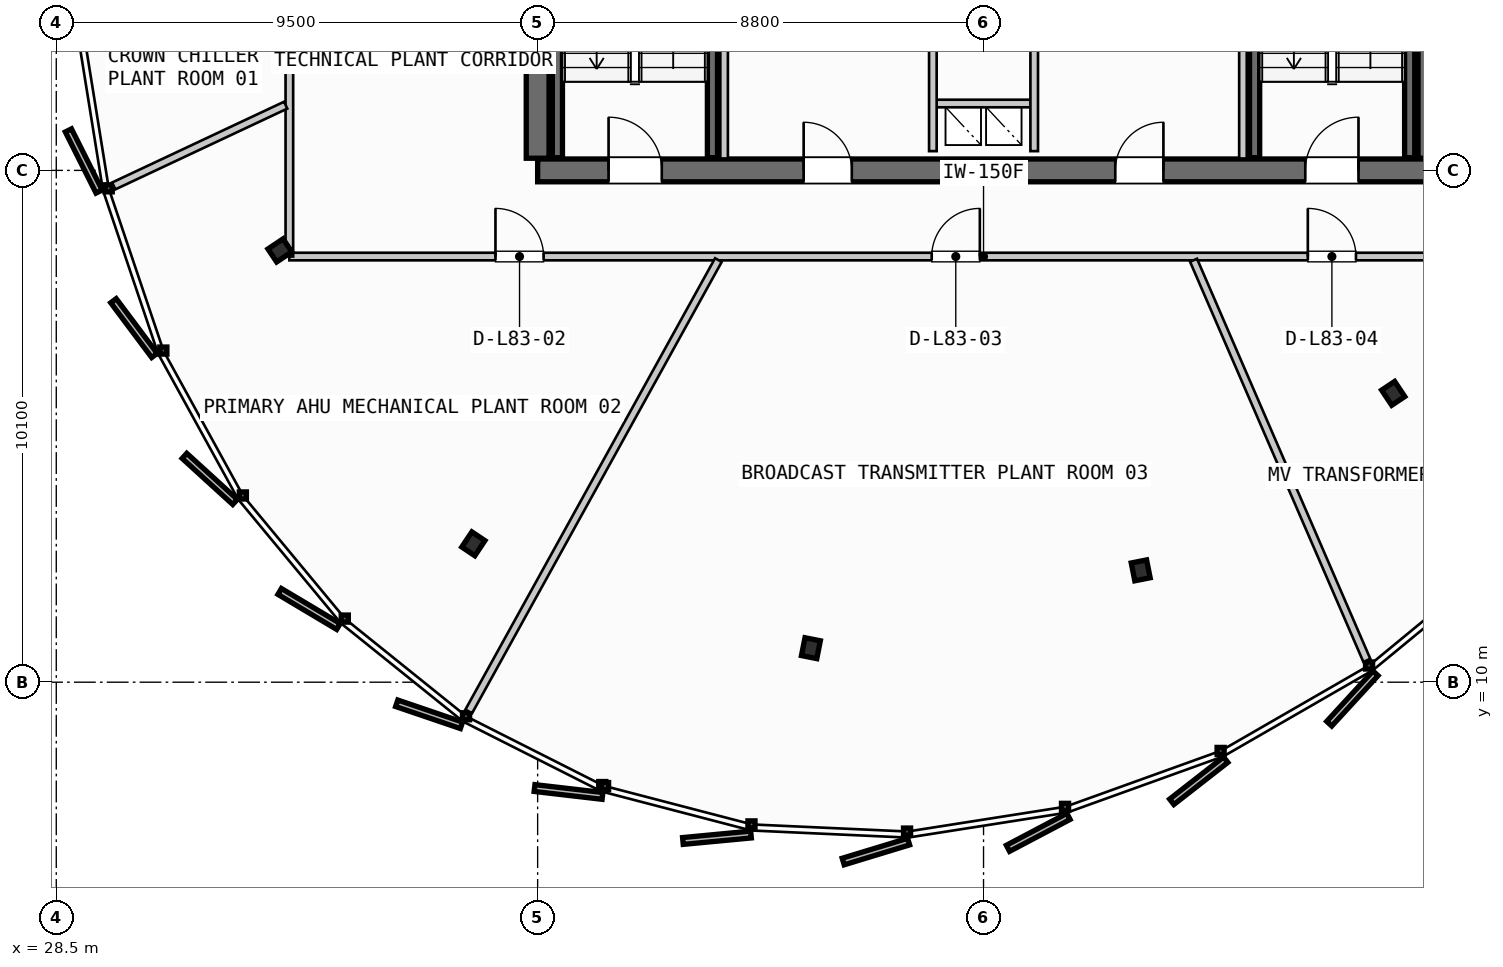
"""IFC4 building model, lengths in metres.
Left out: names, types, materials, properties, quantities, classifications, styles, units other than length and angle.
Written with IfcOpenShell. Run it as: python <this file> out.ifc"""

import sys

from ifc_helpers import new_model, si_unit, direction, frame, frame_2d, origin, origin_2d, place, context, subcontext, project, spatial, rectangle, i_section, extrude, source, transform, mapped, element, fill, save


model = new_model("IFC4")
c1 = context("Model", 3, precision=1e-05, world=origin(), true_north=direction((0.0, 1.0)))
c2 = subcontext(c1, "Body", "Model", "MODEL_VIEW")
j1 = project(units=[si_unit("LENGTHUNIT", "METRE"), si_unit("PLANEANGLEUNIT", "RADIAN")], contexts=[c1])
p1 = place(None, origin())
s1 = spatial("IfcSite", under=j1, at=p1, CompositionType="ELEMENT")
p2 = place(p1, origin())
s2 = spatial("IfcBuilding", under=s1, at=p2, CompositionType="ELEMENT")
p3 = place(p2, frame((0.0, 0.0, 312.3)))
s3 = spatial("IfcBuildingStorey", under=s2, at=p3, CompositionType="ELEMENT", Elevation=312.3)
p4 = place(p3, frame((38.0, 20.1, 0.0), z_axis=(0.0, 0.0, 1.0), x_axis=(1.0, 0.0, 0.0)))
e1 = element("IfcWall", 1, at=p4, inside=s3, PredefinedType="SHEAR", context=c2, shape_type="SweptSolid", body=[
    extrude(rectangle(XDim=17.6, YDim=0.45, at=frame_2d((8.8, 0.0))), origin(), (0.0, 0.0, 1.0), 3.735),
])
p5 = place(p4, frame((1.4, 0.0, 0.0)))
e2 = element("IfcOpeningElement", 2, at=p5, cuts=e1, PredefinedType="OPENING", context=c2, shape_type="SweptSolid", body=[
    extrude(rectangle(XDim=1.05, YDim=2.15, at=frame_2d((0.525, 1.075))), frame((0.0, 0.235, 0.0), z_axis=(0.0, -1.0, 0.0), x_axis=(1.0, 0.0, 0.0)), (0.0, 0.0, 1.0), 0.47),
])
p6 = place(p4, frame((15.15, 0.0, 0.0)))
e3 = element("IfcOpeningElement", 3, at=p6, cuts=e1, PredefinedType="OPENING", context=c2, shape_type="SweptSolid", body=[
    extrude(rectangle(XDim=1.05, YDim=2.15, at=frame_2d((0.525, 1.075))), frame((0.0, 0.235, 0.0), z_axis=(0.0, -1.0, 0.0), x_axis=(1.0, 0.0, 0.0)), (0.0, 0.0, 1.0), 0.47),
])
p7 = place(p4, frame((5.25, 0.0, 0.0)))
e4 = element("IfcOpeningElement", 4, at=p7, cuts=e1, PredefinedType="OPENING", context=c2, shape_type="SweptSolid", body=[
    extrude(rectangle(XDim=0.95, YDim=2.15, at=frame_2d((0.475, 1.075))), frame((0.0, 0.235, 0.0), z_axis=(0.0, -1.0, 0.0), x_axis=(1.0, 0.0, 0.0)), (0.0, 0.0, 1.0), 0.47),
])
p8 = place(p4, frame((11.4, 0.0, 0.0)))
e5 = element("IfcOpeningElement", 5, at=p8, cuts=e1, PredefinedType="OPENING", context=c2, shape_type="SweptSolid", body=[
    extrude(rectangle(XDim=0.95, YDim=2.15, at=frame_2d((0.475, 1.075))), frame((0.0, 0.235, 0.0), z_axis=(0.0, -1.0, 0.0), x_axis=(1.0, 0.0, 0.0)), (0.0, 0.0, 1.0), 0.47),
])
p9 = place(p3, frame((38.0, 35.26, 0.0), z_axis=(0.0, 0.0, 1.0), x_axis=(0.0, -1.0, 0.0)))
e6 = element("IfcWall", 6, at=p9, inside=s3, PredefinedType="SHEAR", context=c2, shape_type="SweptSolid", body=[
    extrude(rectangle(XDim=14.92, YDim=0.45, at=frame_2d((7.46, 0.0))), origin(), (0.0, 0.0, 1.0), 3.735),
])
p10 = place(p9, frame((5.21, 0.0, 0.0)))
e7 = element("IfcOpeningElement", 7, at=p10, cuts=e6, PredefinedType="OPENING", context=c2, shape_type="SweptSolid", body=[
    extrude(rectangle(XDim=1.1, YDim=2.2, at=frame_2d((0.55, 1.1))), frame((0.0, 0.235, 0.0), z_axis=(0.0, -1.0, 0.0), x_axis=(1.0, 0.0, 0.0)), (0.0, 0.0, 1.0), 0.47),
])
p11 = place(p3, frame((55.6, 20.34, 0.0), z_axis=(0.0, 0.0, 1.0), x_axis=(0.0, 1.0, 0.0)))
e8 = element("IfcWall", 8, at=p11, inside=s3, PredefinedType="SHEAR", context=c2, shape_type="SweptSolid", body=[
    extrude(rectangle(XDim=14.92, YDim=0.45, at=frame_2d((7.46, 0.0))), origin(), (0.0, 0.0, 1.0), 3.735),
])
p12 = place(p11, frame((12.71, 0.0, 0.0)))
e9 = element("IfcOpeningElement", 9, at=p12, cuts=e8, PredefinedType="OPENING", context=c2, shape_type="SweptSolid", body=[
    extrude(rectangle(XDim=1.05, YDim=2.15, at=frame_2d((0.525, 1.075))), frame((0.0, 0.235, 0.0), z_axis=(0.0, -1.0, 0.0), x_axis=(1.0, 0.0, 0.0)), (0.0, 0.0, 1.0), 0.47),
])
p13 = place(p11, frame((8.61, 0.0, 0.0)))
e10 = element("IfcOpeningElement", 10, at=p13, cuts=e8, PredefinedType="OPENING", context=c2, shape_type="SweptSolid", body=[
    extrude(rectangle(XDim=1.1, YDim=2.2, at=frame_2d((0.55, 1.1))), frame((0.0, 0.235, 0.0), z_axis=(0.0, -1.0, 0.0), x_axis=(1.0, 0.0, 0.0)), (0.0, 0.0, 1.0), 0.47),
])
m1 = source(origin(), c2, "Body", "SweptSolid", [
    extrude(i_section(OverallWidth=0.309, OverallDepth=0.359, WebThickness=0.016, FlangeThickness=0.026, FilletRadius=0.027, at=origin_2d()), origin(), (0.0, 0.0, 1.0), 3.735),
])
for number, where, z_axis, x_axis in (
    (11, (32.913, 18.521, 0.0), (0.0, 0.0, 1.0), (-0.831, -0.556, 0.0)),
    (12, (36.731, 12.731, 0.0), (0.0, 0.0, 1.0), (-0.556, -0.831, 0.0)),
    (13, (43.393, 10.671, 0.0), (0.0, 0.0, 1.0), (-0.195, -0.981, 0.0)),
    (14, (49.902, 12.207, 0.0), (0.0, 0.0, 1.0), (0.195, -0.981, 0.0)),
    (15, (54.885, 15.7, 0.0), (0.0, 0.0, 1.0), (0.556, -0.831, 0.0)),
):
    element("IfcColumn", number, at=place(p3, frame(where, z_axis=z_axis, x_axis=x_axis)), inside=s3, PredefinedType="COLUMN", context=c2, shape_type="MappedRepresentation", body=[
        mapped(m1, transform((0.0, 0.0, 0.0), scale=1.0)),
    ])
for number, where, z_axis, x_axis in (
    (16, (41.45, 27.7, 0.0), (0.0, 0.0, 1.0), (0.0, -1.0, 0.0)),
    (17, (38.39, 20.35, 0.0), (0.0, 0.0, 1.0), (0.0, 1.0, 0.0)),
    (18, (55.21, 27.7, 0.0), (0.0, 0.0, 1.0), (0.0, -1.0, 0.0)),
    (19, (52.15, 20.35, 0.0), (0.0, 0.0, 1.0), (0.0, 1.0, 0.0)),
):
    element("IfcWall", number, at=place(p3, frame(where, z_axis=z_axis, x_axis=x_axis)), inside=s3, PredefinedType="SHEAR", context=c2, shape_type="SweptSolid", body=[
        extrude(rectangle(XDim=7.35, YDim=0.2, at=frame_2d((3.675, 0.0))), origin(), (0.0, 0.0, 1.0), 3.735),
    ])
p14 = place(p3, frame((45.8, 21.42, 0.0), z_axis=(0.0, 0.0, 1.0), x_axis=(1.0, 0.0, 0.0)))
e20 = element("IfcWall", 20, at=p14, inside=s3, PredefinedType="PARTITIONING", context=c2, shape_type="SweptSolid", body=[
    extrude(rectangle(XDim=2.0, YDim=0.15, at=frame_2d((1.0, 0.0))), origin(), (0.0, 0.0, 1.0), 3.26),
])
for number, where, z_axis, x_axis in (
    (21, (45.8, 20.48, 0.0), (0.0, 0.0, 1.0), (0.0, 1.0, 0.0)),
    (22, (47.8, 20.48, 0.0), (0.0, 0.0, 1.0), (0.0, 1.0, 0.0)),
):
    element("IfcWall", number, at=place(p3, frame(where, z_axis=z_axis, x_axis=x_axis)), inside=s3, PredefinedType="PARTITIONING", context=c2, shape_type="SweptSolid", body=[
        extrude(rectangle(XDim=2.24, YDim=0.15, at=frame_2d((1.12, 0.0))), origin(), (0.0, 0.0, 1.0), 3.26),
    ])
for number, where, z_axis, x_axis in (
    (23, (41.68, 20.335, 0.0), (0.0, 0.0, 1.0), (0.0, 1.0, 0.0)),
    (24, (51.92, 20.335, 0.0), (0.0, 0.0, 1.0), (0.0, 1.0, 0.0)),
):
    element("IfcWall", number, at=place(p3, frame(where, z_axis=z_axis, x_axis=x_axis)), inside=s3, PredefinedType="PARTITIONING", context=c2, shape_type="SweptSolid", body=[
        extrude(rectangle(XDim=2.395, YDim=0.15, at=frame_2d((1.198, 0.0))), origin(), (0.0, 0.0, 1.0), 3.26),
    ])
p15 = place(p3, frame((33.1, 18.4, 0.0), z_axis=(0.0, 0.0, 1.0), x_axis=(1.0, 0.0, 0.0)))
e25 = element("IfcWall", 25, at=p15, inside=s3, PredefinedType="PARTITIONING", context=c2, shape_type="SweptSolid", body=[
    extrude(rectangle(XDim=27.4, YDim=0.15, at=frame_2d((13.7, 0.0))), origin(), (0.0, 0.0, 1.0), 3.26),
])
p16 = place(p15, frame((4.068, 0.0, 0.0)))
e26 = element("IfcOpeningElement", 26, at=p16, cuts=e25, PredefinedType="OPENING", context=c2, shape_type="SweptSolid", body=[
    extrude(rectangle(XDim=0.95, YDim=2.15, at=frame_2d((0.475, 1.075))), frame((0.0, 0.085, 0.0), z_axis=(0.0, -1.0, 0.0), x_axis=(1.0, 0.0, 0.0)), (0.0, 0.0, 1.0), 0.17),
])
p17 = place(p15, frame((12.677, 0.0, 0.0)))
e27 = element("IfcOpeningElement", 27, at=p17, cuts=e25, PredefinedType="OPENING", context=c2, shape_type="SweptSolid", body=[
    extrude(rectangle(XDim=0.95, YDim=2.15, at=frame_2d((0.475, 1.075))), frame((0.0, 0.085, 0.0), z_axis=(0.0, -1.0, 0.0), x_axis=(1.0, 0.0, 0.0)), (0.0, 0.0, 1.0), 0.17),
])
p18 = place(p15, frame((20.1, 0.0, 0.0)))
e28 = element("IfcOpeningElement", 28, at=p18, cuts=e25, PredefinedType="OPENING", context=c2, shape_type="SweptSolid", body=[
    extrude(rectangle(XDim=0.95, YDim=2.15, at=frame_2d((0.475, 1.075))), frame((0.0, 0.085, 0.0), z_axis=(0.0, -1.0, 0.0), x_axis=(1.0, 0.0, 0.0)), (0.0, 0.0, 1.0), 0.17),
])
p19 = place(p3, frame((33.1, 37.2, 0.0), z_axis=(0.0, 0.0, 1.0), x_axis=(0.0, -1.0, 0.0)))
e29 = element("IfcWall", 29, at=p19, inside=s3, PredefinedType="PARTITIONING", context=c2, shape_type="SweptSolid", body=[
    extrude(rectangle(XDim=18.8, YDim=0.15, at=frame_2d((9.4, 0.0))), origin(), (0.0, 0.0, 1.0), 3.26),
])
p20 = place(p19, frame((12.917, 0.0, 0.0)))
e30 = element("IfcOpeningElement", 30, at=p20, cuts=e29, PredefinedType="OPENING", context=c2, shape_type="SweptSolid", body=[
    extrude(rectangle(XDim=0.95, YDim=2.15, at=frame_2d((0.475, 1.075))), frame((0.0, 0.085, 0.0), z_axis=(0.0, -1.0, 0.0), x_axis=(1.0, 0.0, 0.0)), (0.0, 0.0, 1.0), 0.17),
])
p21 = place(p19, frame((4.503, 0.0, 0.0)))
e31 = element("IfcOpeningElement", 31, at=p21, cuts=e29, PredefinedType="OPENING", context=c2, shape_type="SweptSolid", body=[
    extrude(rectangle(XDim=0.95, YDim=2.15, at=frame_2d((0.475, 1.075))), frame((0.0, 0.085, 0.0), z_axis=(0.0, -1.0, 0.0), x_axis=(1.0, 0.0, 0.0)), (0.0, 0.0, 1.0), 0.17),
])
p22 = place(p3, frame((33.028, 21.387, 0.0), z_axis=(0.0, 0.0, 1.0), x_axis=(-0.905123946603, -0.425147787581, 0.0)))
e32 = element("IfcWall", 32, at=p22, inside=s3, PredefinedType="PARTITIONING", context=c2, shape_type="SweptSolid", body=[
    extrude(rectangle(XDim=3.749, YDim=0.15, at=frame_2d((1.875, 0.0))), origin(), (0.0, 0.0, 1.0), 3.26),
])
p23 = place(p3, frame((41.567, 18.33, 0.0), z_axis=(0.0, 0.0, 1.0), x_axis=(-0.48403520287, -0.87504852573, 0.0)))
e33 = element("IfcWall", 33, at=p23, inside=s3, PredefinedType="PARTITIONING", context=c2, shape_type="SweptSolid", body=[
    extrude(rectangle(XDim=10.178, YDim=0.15, at=frame_2d((5.089, 0.0))), origin(), (0.0, 0.0, 1.0), 3.26),
])
p24 = place(p3, frame((50.945, 18.327, 0.0), z_axis=(0.0, 0.0, 1.0), x_axis=(0.39746729675, -0.917616340316, 0.0)))
e34 = element("IfcWall", 34, at=p24, inside=s3, PredefinedType="PARTITIONING", context=c2, shape_type="SweptSolid", body=[
    extrude(rectangle(XDim=8.605, YDim=0.15, at=frame_2d((4.302, 0.0))), origin(), (0.0, 0.0, 1.0), 3.26),
])
m2 = source(origin(), c2, "Body", "SweptSolid", [
    extrude(rectangle(XDim=1.05, YDim=2.15, at=frame_2d((0.525, 1.075))), frame((0.0, 0.025, 0.0), z_axis=(0.0, -1.0, 0.0), x_axis=(1.0, 0.0, 0.0)), (0.0, 0.0, 1.0), 0.05),
])
p25 = place(p5, origin())
e35 = element("IfcDoor", 35, at=p25, inside=s3, OperationType="SINGLE_SWING_LEFT", PredefinedType="DOOR", context=c2, shape_type="MappedRepresentation", body=[
    mapped(m2, transform((0.0, 0.0, 0.0), scale=1.0)),
])
fill(e2, e35)
p26 = place(p6, origin())
e36 = element("IfcDoor", 36, at=p26, inside=s3, OperationType="SINGLE_SWING_RIGHT", PredefinedType="DOOR", context=c2, shape_type="MappedRepresentation", body=[
    mapped(m2, transform((0.0, 0.0, 0.0), scale=1.0)),
])
fill(e3, e36)
m3 = source(origin(), c2, "Body", "SweptSolid", [
    extrude(rectangle(XDim=0.95, YDim=2.15, at=frame_2d((0.475, 1.075))), frame((0.0, 0.025, 0.0), z_axis=(0.0, -1.0, 0.0), x_axis=(1.0, 0.0, 0.0)), (0.0, 0.0, 1.0), 0.05),
])
p27 = place(p7, origin())
e37 = element("IfcDoor", 37, at=p27, inside=s3, OperationType="SINGLE_SWING_LEFT", PredefinedType="DOOR", context=c2, shape_type="MappedRepresentation", body=[
    mapped(m3, transform((0.0, 0.0, 0.0), scale=1.0)),
])
fill(e4, e37)
p28 = place(p8, origin())
e38 = element("IfcDoor", 38, at=p28, inside=s3, OperationType="SINGLE_SWING_RIGHT", PredefinedType="DOOR", context=c2, shape_type="MappedRepresentation", body=[
    mapped(m3, transform((0.0, 0.0, 0.0), scale=1.0)),
])
fill(e5, e38)
p29 = place(p16, origin())
e39 = element("IfcDoor", 39, at=p29, inside=s3, OperationType="SINGLE_SWING_LEFT", PredefinedType="DOOR", context=c2, shape_type="MappedRepresentation", body=[
    mapped(m3, transform((0.0, 0.0, 0.0), scale=1.0)),
])
fill(e26, e39)
p30 = place(p17, origin())
e40 = element("IfcDoor", 40, at=p30, inside=s3, OperationType="SINGLE_SWING_RIGHT", PredefinedType="DOOR", context=c2, shape_type="MappedRepresentation", body=[
    mapped(m3, transform((0.0, 0.0, 0.0), scale=1.0)),
])
fill(e27, e40)
p31 = place(p18, origin())
e41 = element("IfcDoor", 41, at=p31, inside=s3, OperationType="SINGLE_SWING_LEFT", PredefinedType="DOOR", context=c2, shape_type="MappedRepresentation", body=[
    mapped(m3, transform((0.0, 0.0, 0.0), scale=1.0)),
])
fill(e28, e41)
save(model, sys.argv[1])
